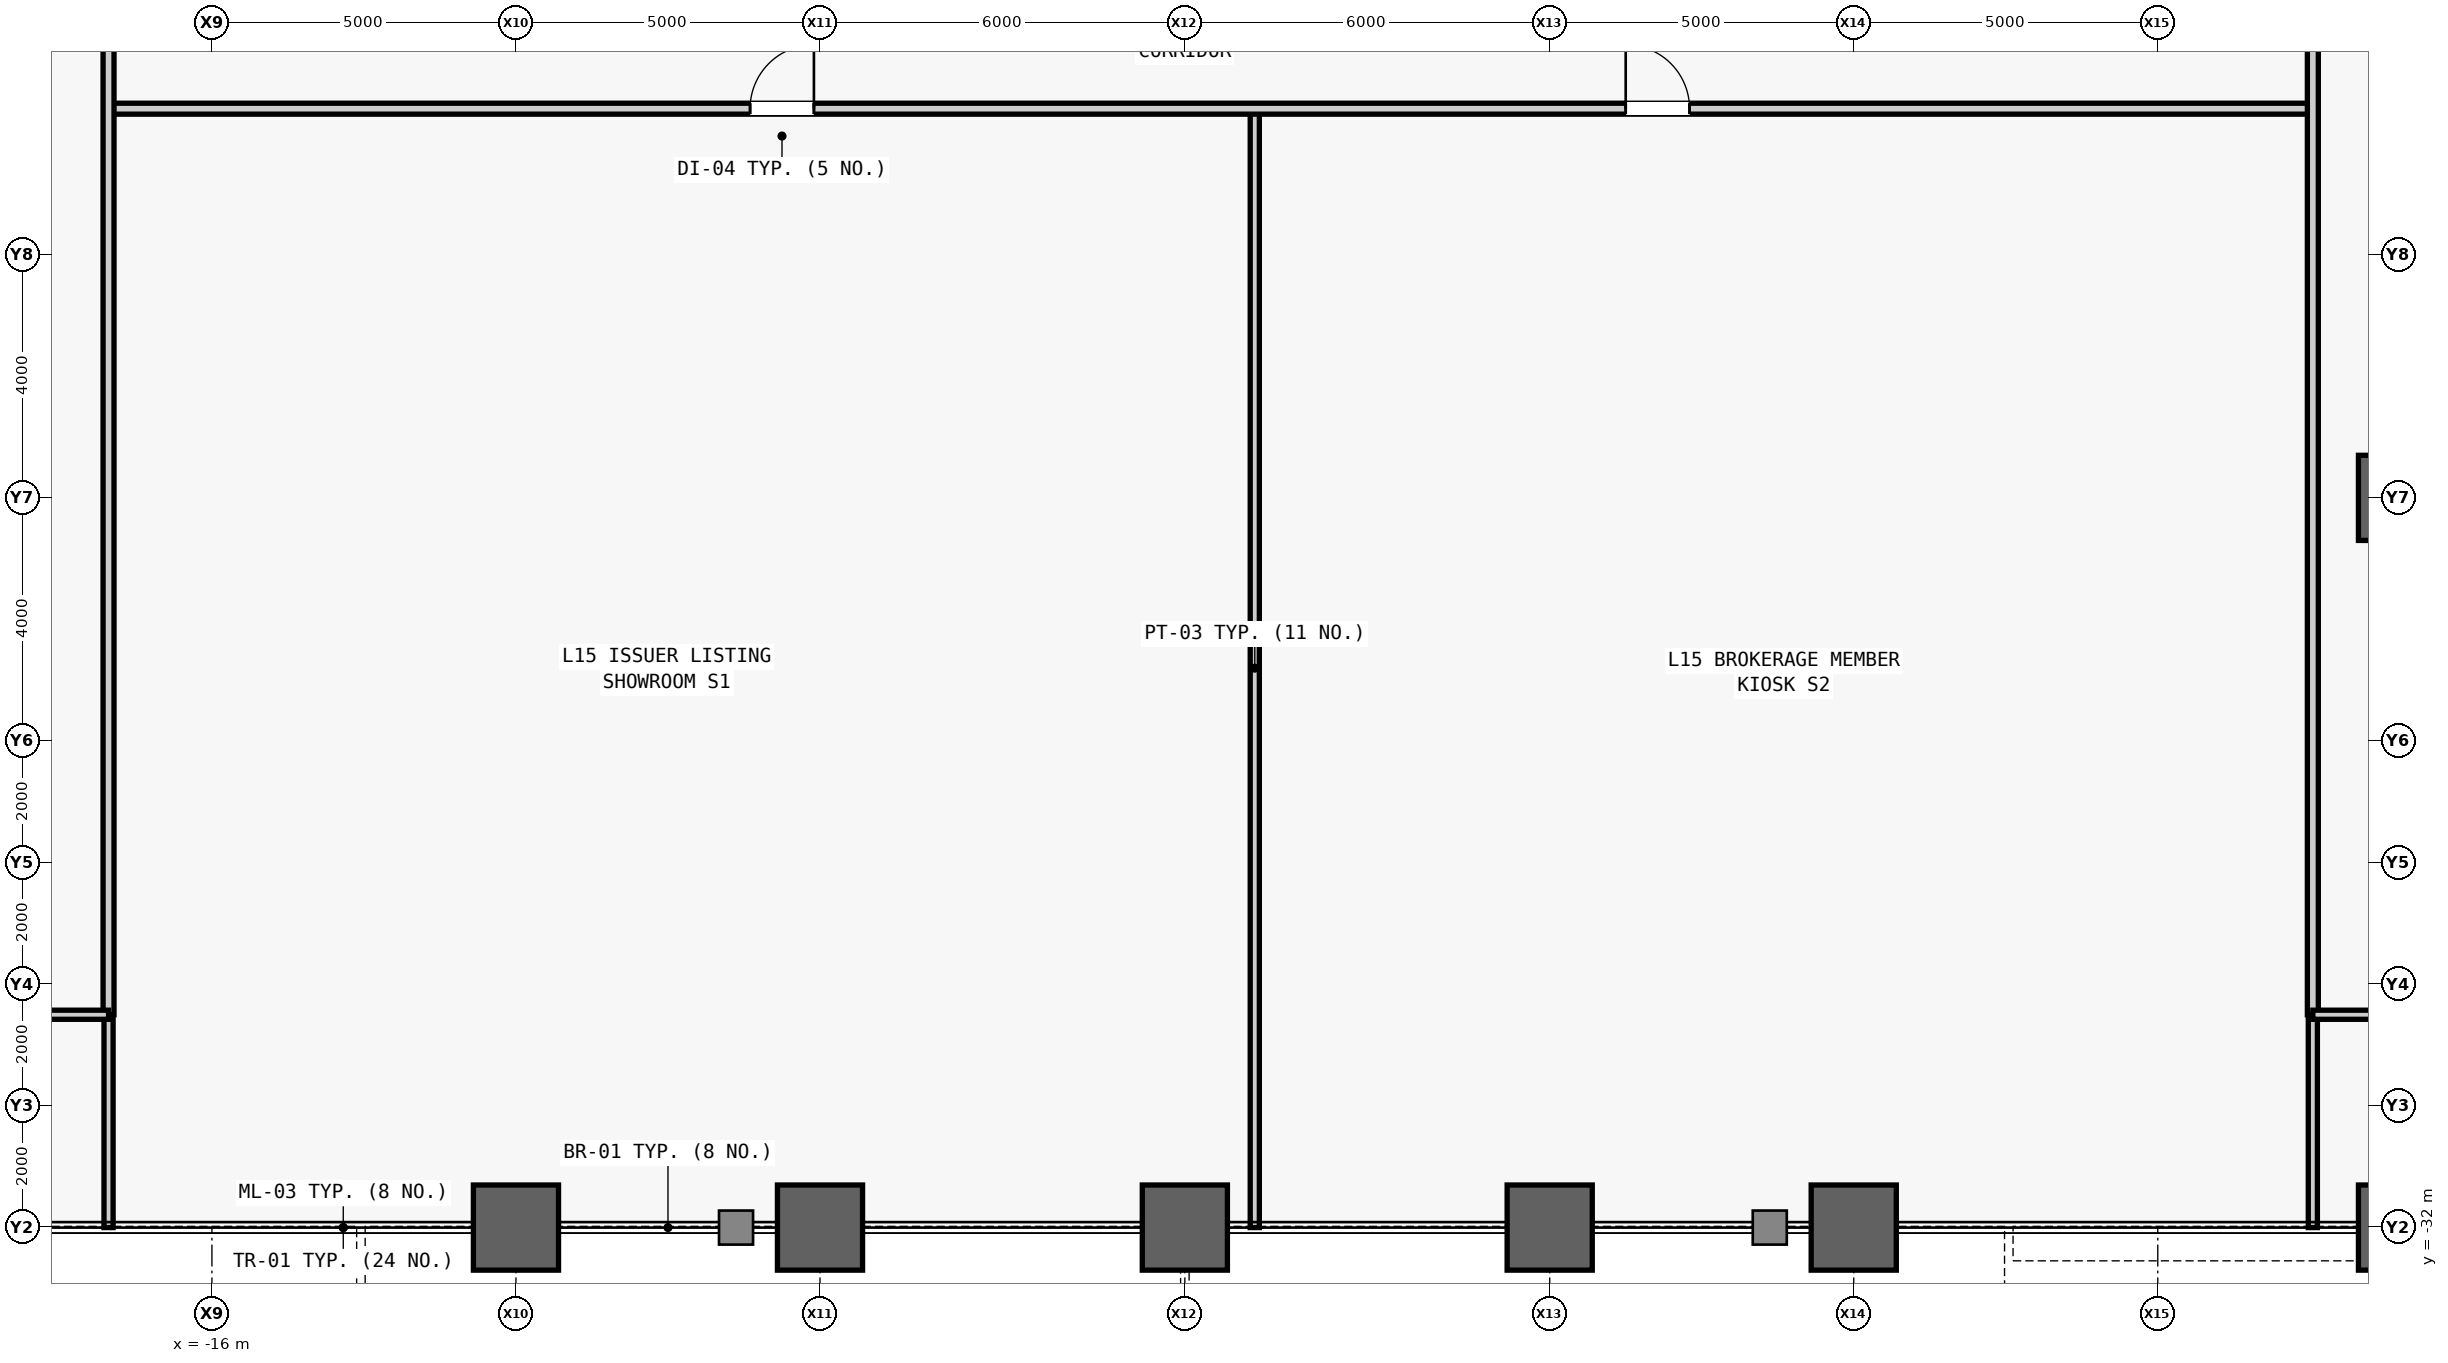
"""IFC4 building model, lengths in metres.
Left out: names, types, materials, properties, quantities, classifications, styles, units other than length and angle.
Written with IfcOpenShell. Run it as: python <this file> out.ifc"""

import sys

from ifc_helpers import new_model, si_unit, direction, frame, frame_2d, origin, origin_2d, place, context, subcontext, project, spatial, rectangle, hollow_rectangle, extrude, source, transform, mapped, element, fill, save


model = new_model("IFC4")
c1 = context("Model", 3, precision=1e-05, world=origin(), true_north=direction((0.0, 1.0)))
c2 = subcontext(c1, "Body", "Model", "MODEL_VIEW")
j1 = project(units=[si_unit("LENGTHUNIT", "METRE"), si_unit("PLANEANGLEUNIT", "RADIAN")], contexts=[c1])
p1 = place(None, origin())
s1 = spatial("IfcSite", under=j1, at=p1, CompositionType="ELEMENT")
p2 = place(p1, origin())
s2 = spatial("IfcBuilding", under=s1, at=p2, CompositionType="ELEMENT")
p3 = place(p2, frame((0.0, 0.0, 70.4)))
s3 = spatial("IfcBuildingStorey", under=s2, at=p3, CompositionType="ELEMENT", Elevation=70.4)
m1 = source(origin(), c2, "Body", "SweptSolid", [
    extrude(hollow_rectangle(XDim=1.4, YDim=1.4, WallThickness=0.075, at=origin_2d()), origin(), (0.0, 0.0, 1.0), 4.2),
])
for number, where, z_axis, x_axis in (
    (1, (-11.0, -32.0, 0.0), (0.0, 0.0, 1.0), (1.0, 0.0, 0.0)),
    (2, (-6.0, -32.0, 0.0), (0.0, 0.0, 1.0), (1.0, 0.0, 0.0)),
    (3, (0.0, -32.0, 0.0), (0.0, 0.0, 1.0), (1.0, 0.0, 0.0)),
    (4, (6.0, -32.0, 0.0), (0.0, 0.0, 1.0), (1.0, 0.0, 0.0)),
    (5, (11.0, -32.0, 0.0), (0.0, 0.0, 1.0), (1.0, 0.0, 0.0)),
    (6, (20.0, -32.0, 0.0), (0.0, 0.0, 1.0), (1.0, 0.0, 0.0)),
    (7, (20.0, -20.0, 0.0), (0.0, 0.0, 1.0), (1.0, 0.0, 0.0)),
):
    element("IfcColumn", number, at=place(p3, frame(where, z_axis=z_axis, x_axis=x_axis)), inside=s3, PredefinedType="COLUMN", context=c2, shape_type="MappedRepresentation", body=[
        mapped(m1, transform((0.0, 0.0, 0.0), scale=1.0)),
    ])
m2 = source(origin(), c2, "Body", "SweptSolid", [
    extrude(rectangle(XDim=18.4, YDim=0.15, at=frame_2d((9.2, 0.0))), origin(), (0.0, 0.0, 1.0), 3.94),
])
p4 = place(p3, frame((1.15, -32.0, 0.0), z_axis=(0.0, 0.0, 1.0), x_axis=(0.0, 1.0, 0.0)))
e8 = element("IfcWall", 8, at=p4, inside=s3, PredefinedType="PARTITIONING", context=c2, shape_type="MappedRepresentation", body=[
    mapped(m2, transform((0.0, 0.0, 0.0), scale=1.0)),
])
m3 = source(origin(), c2, "Body", "SweptSolid", [
    extrude(rectangle(XDim=36.25, YDim=0.18, at=frame_2d((18.125, 0.0))), origin(), (0.0, 0.0, 1.0), 3.94),
])
p5 = place(p3, frame((-17.7, -13.6, 0.0), z_axis=(0.0, 0.0, 1.0), x_axis=(1.0, 0.0, 0.0)))
e9 = element("IfcWall", 9, at=p5, inside=s3, PredefinedType="PARTITIONING", context=c2, shape_type="MappedRepresentation", body=[
    mapped(m3, transform((0.0, 0.0, 0.0), scale=1.0)),
])
m4 = source(origin(), c2, "Body", "SweptSolid", [
    extrude(rectangle(XDim=1.05, YDim=2.2, at=frame_2d((0.525, 1.1))), frame((0.0, 0.1, 0.0), z_axis=(0.0, -1.0, 0.0), x_axis=(1.0, 0.0, 0.0)), (0.0, 0.0, 1.0), 0.2),
])
p6 = place(p5, frame((10.55, 0.0, 0.0)))
e10 = element("IfcOpeningElement", 10, at=p6, cuts=e9, PredefinedType="OPENING", context=c2, shape_type="MappedRepresentation", body=[
    mapped(m4, transform((0.0, 0.0, 0.0), scale=1.0)),
])
p7 = place(p5, frame((24.95, 0.0, 0.0)))
e11 = element("IfcOpeningElement", 11, at=p7, cuts=e9, PredefinedType="OPENING", context=c2, shape_type="MappedRepresentation", body=[
    mapped(m4, transform((0.0, 0.0, 0.0), scale=1.0)),
])
m5 = source(origin(), c2, "Body", "SweptSolid", [
    extrude(rectangle(XDim=3.5, YDim=0.15, at=frame_2d((1.75, 0.0))), origin(), (0.0, 0.0, 1.0), 3.94),
])
for number, where, z_axis, x_axis in (
    (12, (-17.7, -32.0, 0.0), (0.0, 0.0, 1.0), (0.0, 1.0, 0.0)),
    (13, (18.55, -32.0, 0.0), (0.0, 0.0, 1.0), (0.0, 1.0, 0.0)),
):
    element("IfcWall", number, at=place(p3, frame(where, z_axis=z_axis, x_axis=x_axis)), inside=s3, PredefinedType="PARTITIONING", context=c2, shape_type="MappedRepresentation", body=[
        mapped(m5, transform((0.0, 0.0, 0.0), scale=1.0)),
    ])
m6 = source(origin(), c2, "Body", "SweptSolid", [
    extrude(rectangle(XDim=57.0, YDim=0.18, at=frame_2d((28.5, 0.0))), origin(), (0.0, 0.0, 1.0), 3.94),
])
p8 = place(p3, frame((-17.7, -28.5, 0.0), z_axis=(0.0, 0.0, 1.0), x_axis=(0.0, 1.0, 0.0)))
e14 = element("IfcWall", 14, at=p8, inside=s3, PredefinedType="PARTITIONING", context=c2, shape_type="MappedRepresentation", body=[
    mapped(m6, transform((0.0, 0.0, 0.0), scale=1.0)),
])
m7 = source(origin(), c2, "Body", "SweptSolid", [
    extrude(rectangle(XDim=0.95, YDim=2.15, at=frame_2d((0.475, 1.075))), frame((0.0, 0.1, 0.0), z_axis=(0.0, -1.0, 0.0), x_axis=(1.0, 0.0, 0.0)), (0.0, 0.0, 1.0), 0.2),
])
p9 = place(p8, frame((21.663, 0.0, 0.0)))
e15 = element("IfcOpeningElement", 15, at=p9, cuts=e14, PredefinedType="OPENING", context=c2, shape_type="MappedRepresentation", body=[
    mapped(m7, transform((0.0, 0.0, 0.0), scale=1.0)),
])
p10 = place(p8, frame((34.938, 0.0, 0.0)))
e16 = element("IfcOpeningElement", 16, at=p10, cuts=e14, PredefinedType="OPENING", context=c2, shape_type="MappedRepresentation", body=[
    mapped(m7, transform((0.0, 0.0, 0.0), scale=1.0)),
])
p11 = place(p3, frame((18.55, -28.5, 0.0), z_axis=(0.0, 0.0, 1.0), x_axis=(0.0, 1.0, 0.0)))
e17 = element("IfcWall", 17, at=p11, inside=s3, PredefinedType="PARTITIONING", context=c2, shape_type="MappedRepresentation", body=[
    mapped(m6, transform((0.0, 0.0, 0.0), scale=1.0)),
])
p12 = place(p11, frame((17.222, 0.0, 0.0)))
e18 = element("IfcOpeningElement", 18, at=p12, cuts=e17, PredefinedType="OPENING", context=c2, shape_type="MappedRepresentation", body=[
    mapped(m7, transform((0.0, 0.0, 0.0), scale=1.0)),
])
p13 = place(p11, frame((22.472, 0.0, 0.0)))
e19 = element("IfcOpeningElement", 19, at=p13, cuts=e17, PredefinedType="OPENING", context=c2, shape_type="MappedRepresentation", body=[
    mapped(m7, transform((0.0, 0.0, 0.0), scale=1.0)),
])
p14 = place(p11, frame((28.855, 0.0, 0.0)))
e20 = element("IfcOpeningElement", 20, at=p14, cuts=e17, PredefinedType="OPENING", context=c2, shape_type="MappedRepresentation", body=[
    mapped(m7, transform((0.0, 0.0, 0.0), scale=1.0)),
])
p15 = place(p11, frame((34.96, 0.0, 0.0)))
e21 = element("IfcOpeningElement", 21, at=p15, cuts=e17, PredefinedType="OPENING", context=c2, shape_type="MappedRepresentation", body=[
    mapped(m7, transform((0.0, 0.0, 0.0), scale=1.0)),
])
p16 = place(p11, frame((39.655, 0.0, 0.0)))
e22 = element("IfcOpeningElement", 22, at=p16, cuts=e17, PredefinedType="OPENING", context=c2, shape_type="MappedRepresentation", body=[
    mapped(m7, transform((0.0, 0.0, 0.0), scale=1.0)),
])
m8 = source(origin(), c2, "Body", "SweptSolid", [
    extrude(rectangle(XDim=10.8, YDim=0.15, at=frame_2d((5.4, 0.0))), origin(), (0.0, 0.0, 1.0), 3.94),
])
p17 = place(p3, frame((-28.5, -28.5, 0.0), z_axis=(0.0, 0.0, 1.0), x_axis=(1.0, 0.0, 0.0)))
e23 = element("IfcWall", 23, at=p17, inside=s3, PredefinedType="PARTITIONING", context=c2, shape_type="MappedRepresentation", body=[
    mapped(m8, transform((0.0, 0.0, 0.0), scale=1.0)),
])
m9 = source(origin(), c2, "Body", "SweptSolid", [
    extrude(rectangle(XDim=0.95, YDim=2.15, at=frame_2d((0.475, 1.075))), frame((0.0, 0.085, 0.0), z_axis=(0.0, -1.0, 0.0), x_axis=(1.0, 0.0, 0.0)), (0.0, 0.0, 1.0), 0.17),
])
p18 = place(p17, frame((4.925, 0.0, 0.0)))
e24 = element("IfcOpeningElement", 24, at=p18, cuts=e23, PredefinedType="OPENING", context=c2, shape_type="MappedRepresentation", body=[
    mapped(m9, transform((0.0, 0.0, 0.0), scale=1.0)),
])
m10 = source(origin(), c2, "Body", "SweptSolid", [
    extrude(rectangle(XDim=9.95, YDim=0.15, at=frame_2d((4.975, 0.0))), origin(), (0.0, 0.0, 1.0), 3.94),
])
p19 = place(p3, frame((18.55, -28.5, 0.0), z_axis=(0.0, 0.0, 1.0), x_axis=(1.0, 0.0, 0.0)))
e25 = element("IfcWall", 25, at=p19, inside=s3, PredefinedType="PARTITIONING", context=c2, shape_type="MappedRepresentation", body=[
    mapped(m10, transform((0.0, 0.0, 0.0), scale=1.0)),
])
p20 = place(p19, frame((4.5, 0.0, 0.0)))
e26 = element("IfcOpeningElement", 26, at=p20, cuts=e25, PredefinedType="OPENING", context=c2, shape_type="MappedRepresentation", body=[
    mapped(m9, transform((0.0, 0.0, 0.0), scale=1.0)),
])
m11 = source(origin(), c2, "Body", "SweptSolid", [
    extrude(rectangle(XDim=1.05, YDim=2.2, at=frame_2d((0.525, 1.1))), frame((0.0, 0.025, 0.0), z_axis=(0.0, -1.0, 0.0), x_axis=(1.0, 0.0, 0.0)), (0.0, 0.0, 1.0), 0.05),
])
p21 = place(p6, origin())
e27 = element("IfcDoor", 27, at=p21, inside=s3, OperationType="SINGLE_SWING_RIGHT", PredefinedType="DOOR", context=c2, shape_type="MappedRepresentation", body=[
    mapped(m11, transform((0.0, 0.0, 0.0), scale=1.0)),
])
fill(e10, e27)
p22 = place(p7, origin())
e28 = element("IfcDoor", 28, at=p22, inside=s3, OperationType="SINGLE_SWING_LEFT", PredefinedType="DOOR", context=c2, shape_type="MappedRepresentation", body=[
    mapped(m11, transform((0.0, 0.0, 0.0), scale=1.0)),
])
fill(e11, e28)
save(model, sys.argv[1])
